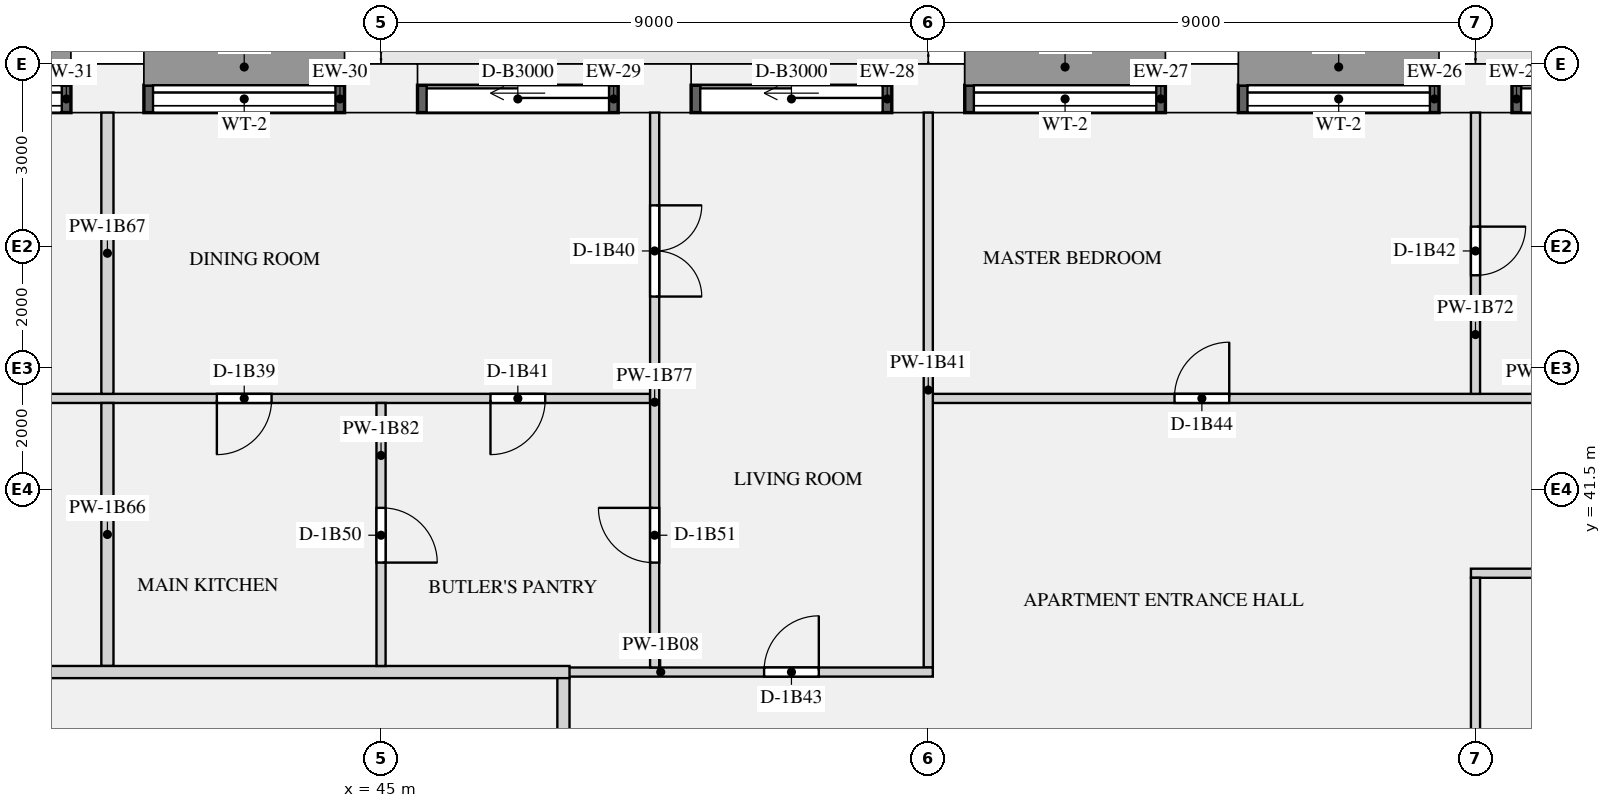
"""IFC4 building model, lengths in metres.
Left out: names, types, materials, properties, quantities, classifications, styles, units other than length and angle.
Written with IfcOpenShell. Run it as: python <this file> out.ifc"""

import sys

from ifc_helpers import new_model, si_unit, direction, frame, frame_2d, origin, origin_2d, place, context, subcontext, project, spatial, rectangle, extrude, element, fill, save


model = new_model("IFC4")
c1 = context("Model", 3, precision=1e-05, world=origin(), true_north=direction((0.0, 1.0)))
c2 = subcontext(c1, "Body", "Model", "MODEL_VIEW")
j1 = project(units=[si_unit("LENGTHUNIT", "METRE"), si_unit("PLANEANGLEUNIT", "RADIAN")], contexts=[c1])
p1 = place(None, origin())
s1 = spatial("IfcSite", under=j1, at=p1, CompositionType="ELEMENT")
p2 = place(p1, origin())
s2 = spatial("IfcBuilding", under=s1, at=p2, CompositionType="ELEMENT")
p3 = place(p2, frame((0.0, 0.0, 28.95)))
s3 = spatial("IfcBuildingStorey", under=s2, at=p3, CompositionType="ELEMENT", Elevation=28.95)
for number, where, z_axis, x_axis in (
    (1, (63.0, 48.1, 0.0), (0.0, 0.0, 1.0), (-1.0, 0.0, 0.0)),
    (2, (58.5, 48.1, 0.0), (0.0, 0.0, 1.0), (-1.0, 0.0, 0.0)),
    (3, (54.0, 48.1, 0.0), (0.0, 0.0, 1.0), (-1.0, 0.0, 0.0)),
    (4, (49.5, 48.1, 0.0), (0.0, 0.0, 1.0), (-1.0, 0.0, 0.0)),
    (5, (45.0, 48.1, 0.0), (0.0, 0.0, 1.0), (-1.0, 0.0, 0.0)),
    (6, (40.5, 48.1, 0.0), (0.0, 0.0, 1.0), (-1.0, 0.0, 0.0)),
):
    element("IfcColumn", number, at=place(p3, frame(where, z_axis=z_axis, x_axis=x_axis)), inside=s3, PredefinedType="USERDEFINED", context=c2, shape_type="SweptSolid", body=[
        extrude(rectangle(XDim=1.2, YDim=0.8, at=origin_2d()), origin(), (0.0, 0.0, 1.0), 3.15),
    ])
p4 = place(p3, frame((66.9, 47.925, 0.0), z_axis=(0.0, 0.0, 1.0), x_axis=(-1.0, 0.0, 0.0)))
e7 = element("IfcWall", 7, at=p4, inside=s3, PredefinedType="SOLIDWALL", context=c2, shape_type="SweptSolid", body=[
    extrude(rectangle(XDim=3.3, YDim=0.45, at=frame_2d((1.65, 0.0))), origin(), (0.0, 0.0, 1.0), 2.83),
])
p5 = place(p4, frame((0.15, 0.0, 0.0)))
e8 = element("IfcOpeningElement", 8, at=p5, cuts=e7, PredefinedType="OPENING", context=c2, shape_type="SweptSolid", body=[
    extrude(rectangle(XDim=3.0, YDim=2.3, at=frame_2d((1.5, 1.15))), frame((0.0, 0.235, 0.0), z_axis=(0.0, -1.0, 0.0), x_axis=(1.0, 0.0, 0.0)), (0.0, 0.0, 1.0), 0.47),
])
p6 = place(p3, frame((62.4, 47.925, 0.9), z_axis=(0.0, 0.0, 1.0), x_axis=(-1.0, 0.0, 0.0)))
e9 = element("IfcWall", 9, at=p6, inside=s3, PredefinedType="SOLIDWALL", context=c2, shape_type="SweptSolid", body=[
    extrude(rectangle(XDim=3.3, YDim=0.45, at=frame_2d((1.65, 0.0))), origin(), (0.0, 0.0, 1.0), 1.93),
])
p7 = place(p6, frame((0.15, 0.0, 0.15)))
e10 = element("IfcOpeningElement", 10, at=p7, cuts=e9, PredefinedType="OPENING", context=c2, shape_type="SweptSolid", body=[
    extrude(rectangle(XDim=3.0, YDim=1.5, at=frame_2d((1.5, 0.75))), frame((0.0, 0.235, 0.0), z_axis=(0.0, -1.0, 0.0), x_axis=(1.0, 0.0, 0.0)), (0.0, 0.0, 1.0), 0.47),
])
p8 = place(p3, frame((57.9, 47.925, 0.9), z_axis=(0.0, 0.0, 1.0), x_axis=(-1.0, 0.0, 0.0)))
e11 = element("IfcWall", 11, at=p8, inside=s3, PredefinedType="SOLIDWALL", context=c2, shape_type="SweptSolid", body=[
    extrude(rectangle(XDim=3.3, YDim=0.45, at=frame_2d((1.65, 0.0))), origin(), (0.0, 0.0, 1.0), 1.93),
])
p9 = place(p8, frame((0.15, 0.0, 0.15)))
e12 = element("IfcOpeningElement", 12, at=p9, cuts=e11, PredefinedType="OPENING", context=c2, shape_type="SweptSolid", body=[
    extrude(rectangle(XDim=3.0, YDim=1.5, at=frame_2d((1.5, 0.75))), frame((0.0, 0.235, 0.0), z_axis=(0.0, -1.0, 0.0), x_axis=(1.0, 0.0, 0.0)), (0.0, 0.0, 1.0), 0.47),
])
p10 = place(p3, frame((53.4, 47.925, 0.0), z_axis=(0.0, 0.0, 1.0), x_axis=(-1.0, 0.0, 0.0)))
e13 = element("IfcWall", 13, at=p10, inside=s3, PredefinedType="SOLIDWALL", context=c2, shape_type="SweptSolid", body=[
    extrude(rectangle(XDim=3.3, YDim=0.45, at=frame_2d((1.65, 0.0))), origin(), (0.0, 0.0, 1.0), 2.83),
])
p11 = place(p10, frame((0.15, 0.0, 0.0)))
e14 = element("IfcOpeningElement", 14, at=p11, cuts=e13, PredefinedType="OPENING", context=c2, shape_type="SweptSolid", body=[
    extrude(rectangle(XDim=3.0, YDim=2.3, at=frame_2d((1.5, 1.15))), frame((0.0, 0.235, 0.0), z_axis=(0.0, -1.0, 0.0), x_axis=(1.0, 0.0, 0.0)), (0.0, 0.0, 1.0), 0.47),
])
p12 = place(p3, frame((48.9, 47.925, 0.0), z_axis=(0.0, 0.0, 1.0), x_axis=(-1.0, 0.0, 0.0)))
e15 = element("IfcWall", 15, at=p12, inside=s3, PredefinedType="SOLIDWALL", context=c2, shape_type="SweptSolid", body=[
    extrude(rectangle(XDim=3.3, YDim=0.45, at=frame_2d((1.65, 0.0))), origin(), (0.0, 0.0, 1.0), 2.83),
])
p13 = place(p12, frame((0.15, 0.0, 0.0)))
e16 = element("IfcOpeningElement", 16, at=p13, cuts=e15, PredefinedType="OPENING", context=c2, shape_type="SweptSolid", body=[
    extrude(rectangle(XDim=3.0, YDim=2.3, at=frame_2d((1.5, 1.15))), frame((0.0, 0.235, 0.0), z_axis=(0.0, -1.0, 0.0), x_axis=(1.0, 0.0, 0.0)), (0.0, 0.0, 1.0), 0.47),
])
p14 = place(p3, frame((44.4, 47.925, 0.9), z_axis=(0.0, 0.0, 1.0), x_axis=(-1.0, 0.0, 0.0)))
e17 = element("IfcWall", 17, at=p14, inside=s3, PredefinedType="SOLIDWALL", context=c2, shape_type="SweptSolid", body=[
    extrude(rectangle(XDim=3.3, YDim=0.45, at=frame_2d((1.65, 0.0))), origin(), (0.0, 0.0, 1.0), 1.93),
])
p15 = place(p14, frame((0.15, 0.0, 0.15)))
e18 = element("IfcOpeningElement", 18, at=p15, cuts=e17, PredefinedType="OPENING", context=c2, shape_type="SweptSolid", body=[
    extrude(rectangle(XDim=3.0, YDim=1.5, at=frame_2d((1.5, 0.75))), frame((0.0, 0.235, 0.0), z_axis=(0.0, -1.0, 0.0), x_axis=(1.0, 0.0, 0.0)), (0.0, 0.0, 1.0), 0.47),
])
p16 = place(p3, frame((39.9, 47.925, 0.9), z_axis=(0.0, 0.0, 1.0), x_axis=(-1.0, 0.0, 0.0)))
e19 = element("IfcWall", 19, at=p16, inside=s3, PredefinedType="SOLIDWALL", context=c2, shape_type="SweptSolid", body=[
    extrude(rectangle(XDim=3.3, YDim=0.45, at=frame_2d((1.65, 0.0))), origin(), (0.0, 0.0, 1.0), 1.93),
])
p17 = place(p16, frame((0.15, 0.0, 0.15)))
e20 = element("IfcOpeningElement", 20, at=p17, cuts=e19, PredefinedType="OPENING", context=c2, shape_type="SweptSolid", body=[
    extrude(rectangle(XDim=3.0, YDim=1.5, at=frame_2d((1.5, 0.75))), frame((0.0, 0.235, 0.0), z_axis=(0.0, -1.0, 0.0), x_axis=(1.0, 0.0, 0.0)), (0.0, 0.0, 1.0), 0.47),
])
p18 = place(p3, frame((47.9, 38.5, 0.0), z_axis=(0.0, 0.0, 1.0), x_axis=(1.0, 0.0, 0.0)))
e21 = element("IfcWall", 21, at=p18, inside=s3, PredefinedType="PARTITIONING", context=c2, shape_type="SweptSolid", body=[
    extrude(rectangle(XDim=6.175, YDim=0.15, at=frame_2d((3.087, 0.0))), origin(), (0.0, 0.0, 1.0), 2.83),
])
p19 = place(p18, frame((3.4, 0.0, 0.0)))
e22 = element("IfcOpeningElement", 22, at=p19, cuts=e21, PredefinedType="OPENING", context=c2, shape_type="SweptSolid", body=[
    extrude(rectangle(XDim=0.9, YDim=2.1, at=frame_2d((0.45, 1.05))), frame((0.0, 0.085, 0.0), z_axis=(0.0, -1.0, 0.0), x_axis=(1.0, 0.0, 0.0)), (0.0, 0.0, 1.0), 0.17),
])
p20 = place(p3, frame((23.925, 38.5, 0.0), z_axis=(0.0, 0.0, 1.0), x_axis=(1.0, 0.0, 0.0)))
e23 = element("IfcWall", 23, at=p20, inside=s3, PredefinedType="PARTITIONING", context=c2, shape_type="SweptSolid", body=[
    extrude(rectangle(XDim=24.175, YDim=0.2, at=frame_2d((12.087, 0.0))), origin(), (0.0, 0.0, 1.0), 2.83),
])
p21 = place(p3, frame((18.075, 43.0, 0.0), z_axis=(0.0, 0.0, 1.0), x_axis=(1.0, 0.0, 0.0)))
e24 = element("IfcWall", 24, at=p21, inside=s3, PredefinedType="PARTITIONING", context=c2, shape_type="SweptSolid", body=[
    extrude(rectangle(XDim=31.35, YDim=0.15, at=frame_2d((15.675, 0.0))), origin(), (0.0, 0.0, 1.0), 2.83),
])
p22 = place(p21, frame((17.175, 0.0, 0.0)))
e25 = element("IfcOpeningElement", 25, at=p22, cuts=e24, PredefinedType="OPENING", context=c2, shape_type="SweptSolid", body=[
    extrude(rectangle(XDim=1.5, YDim=2.1, at=frame_2d((0.75, 1.05))), frame((0.0, 0.085, 0.0), z_axis=(0.0, -1.0, 0.0), x_axis=(1.0, 0.0, 0.0)), (0.0, 0.0, 1.0), 0.17),
])
p23 = place(p21, frame((11.475, 0.0, 0.0)))
e26 = element("IfcOpeningElement", 26, at=p23, cuts=e24, PredefinedType="OPENING", context=c2, shape_type="SweptSolid", body=[
    extrude(rectangle(XDim=0.9, YDim=2.1, at=frame_2d((0.45, 1.05))), frame((0.0, 0.085, 0.0), z_axis=(0.0, -1.0, 0.0), x_axis=(1.0, 0.0, 0.0)), (0.0, 0.0, 1.0), 0.17),
])
p24 = place(p21, frame((2.475, 0.0, 0.0)))
e27 = element("IfcOpeningElement", 27, at=p24, cuts=e24, PredefinedType="OPENING", context=c2, shape_type="SweptSolid", body=[
    extrude(rectangle(XDim=0.9, YDim=2.1, at=frame_2d((0.45, 1.05))), frame((0.0, 0.085, 0.0), z_axis=(0.0, -1.0, 0.0), x_axis=(1.0, 0.0, 0.0)), (0.0, 0.0, 1.0), 0.17),
])
p25 = place(p21, frame((24.225, 0.0, 0.0)))
e28 = element("IfcOpeningElement", 28, at=p25, cuts=e24, PredefinedType="OPENING", context=c2, shape_type="SweptSolid", body=[
    extrude(rectangle(XDim=0.9, YDim=2.1, at=frame_2d((0.45, 1.05))), frame((0.0, 0.085, 0.0), z_axis=(0.0, -1.0, 0.0), x_axis=(1.0, 0.0, 0.0)), (0.0, 0.0, 1.0), 0.17),
])
p26 = place(p21, frame((28.725, 0.0, 0.0)))
e29 = element("IfcOpeningElement", 29, at=p26, cuts=e24, PredefinedType="OPENING", context=c2, shape_type="SweptSolid", body=[
    extrude(rectangle(XDim=0.9, YDim=2.1, at=frame_2d((0.45, 1.05))), frame((0.0, 0.085, 0.0), z_axis=(0.0, -1.0, 0.0), x_axis=(1.0, 0.0, 0.0)), (0.0, 0.0, 1.0), 0.17),
])
p27 = place(p3, frame((54.075, 43.0, 0.0), z_axis=(0.0, 0.0, 1.0), x_axis=(1.0, 0.0, 0.0)))
e30 = element("IfcWall", 30, at=p27, inside=s3, PredefinedType="PARTITIONING", context=c2, shape_type="SweptSolid", body=[
    extrude(rectangle(XDim=17.85, YDim=0.15, at=frame_2d((8.925, 0.0))), origin(), (0.0, 0.0, 1.0), 2.83),
])
p28 = place(p27, frame((15.225, 0.0, 0.0)))
e31 = element("IfcOpeningElement", 31, at=p28, cuts=e30, PredefinedType="OPENING", context=c2, shape_type="SweptSolid", body=[
    extrude(rectangle(XDim=0.9, YDim=2.1, at=frame_2d((0.45, 1.05))), frame((0.0, 0.085, 0.0), z_axis=(0.0, -1.0, 0.0), x_axis=(1.0, 0.0, 0.0)), (0.0, 0.0, 1.0), 0.17),
])
p29 = place(p27, frame((3.975, 0.0, 0.0)))
e32 = element("IfcOpeningElement", 32, at=p29, cuts=e30, PredefinedType="OPENING", context=c2, shape_type="SweptSolid", body=[
    extrude(rectangle(XDim=0.9, YDim=2.1, at=frame_2d((0.45, 1.05))), frame((0.0, 0.085, 0.0), z_axis=(0.0, -1.0, 0.0), x_axis=(1.0, 0.0, 0.0)), (0.0, 0.0, 1.0), 0.17),
])
p30 = place(p3, frame((62.925, 40.125, 0.0), z_axis=(0.0, 0.0, 1.0), x_axis=(1.0, 0.0, 0.0)))
e33 = element("IfcWall", 33, at=p30, inside=s3, PredefinedType="PARTITIONING", context=c2, shape_type="SweptSolid", body=[
    extrude(rectangle(XDim=12.775, YDim=0.15, at=frame_2d((6.387, 0.0))), origin(), (0.0, 0.0, 1.0), 2.83),
])
p31 = place(p30, frame((4.125, 0.0, 0.0)))
e34 = element("IfcOpeningElement", 34, at=p31, cuts=e33, PredefinedType="OPENING", context=c2, shape_type="SweptSolid", body=[
    extrude(rectangle(XDim=0.9, YDim=2.1, at=frame_2d((0.45, 1.05))), frame((0.0, 0.085, 0.0), z_axis=(0.0, -1.0, 0.0), x_axis=(1.0, 0.0, 0.0)), (0.0, 0.0, 1.0), 0.17),
])
p32 = place(p3, frame((54.0, 38.575, 0.0), z_axis=(0.0, 0.0, 1.0), x_axis=(0.0, 1.0, 0.0)))
e35 = element("IfcWall", 35, at=p32, inside=s3, PredefinedType="PARTITIONING", context=c2, shape_type="SweptSolid", body=[
    extrude(rectangle(XDim=9.125, YDim=0.15, at=frame_2d((4.562, 0.0))), origin(), (0.0, 0.0, 1.0), 2.83),
])
p33 = place(p3, frame((48.0, 27.1, 0.0), z_axis=(0.0, 0.0, 1.0), x_axis=(0.0, 1.0, 0.0)))
e36 = element("IfcWall", 36, at=p33, inside=s3, PredefinedType="PARTITIONING", context=c2, shape_type="SweptSolid", body=[
    extrude(rectangle(XDim=11.325, YDim=0.2, at=frame_2d((5.663, 0.0))), origin(), (0.0, 0.0, 1.0), 2.83),
])
p34 = place(p33, frame((5.35, 0.0, 0.0)))
e37 = element("IfcOpeningElement", 37, at=p34, cuts=e36, PredefinedType="OPENING", context=c2, shape_type="SweptSolid", body=[
    extrude(rectangle(XDim=1.1, YDim=2.1, at=frame_2d((0.55, 1.05))), frame((0.0, 0.11, 0.0), z_axis=(0.0, -1.0, 0.0), x_axis=(1.0, 0.0, 0.0)), (0.0, 0.0, 1.0), 0.22),
])
p35 = place(p3, frame((40.5, 38.6, 0.0), z_axis=(0.0, 0.0, 1.0), x_axis=(0.0, 1.0, 0.0)))
e38 = element("IfcWall", 38, at=p35, inside=s3, PredefinedType="PARTITIONING", context=c2, shape_type="SweptSolid", body=[
    extrude(rectangle(XDim=4.325, YDim=0.2, at=frame_2d((2.163, 0.0))), origin(), (0.0, 0.0, 1.0), 2.83),
])
p36 = place(p3, frame((40.5, 43.075, 0.0), z_axis=(0.0, 0.0, 1.0), x_axis=(0.0, 1.0, 0.0)))
e39 = element("IfcWall", 39, at=p36, inside=s3, PredefinedType="PARTITIONING", context=c2, shape_type="SweptSolid", body=[
    extrude(rectangle(XDim=4.625, YDim=0.2, at=frame_2d((2.312, 0.0))), origin(), (0.0, 0.0, 1.0), 2.83),
])
p37 = place(p3, frame((63.0, 32.475, 0.0), z_axis=(0.0, 0.0, 1.0), x_axis=(0.0, 1.0, 0.0)))
e40 = element("IfcWall", 40, at=p37, inside=s3, PredefinedType="PARTITIONING", context=c2, shape_type="SweptSolid", body=[
    extrude(rectangle(XDim=7.575, YDim=0.15, at=frame_2d((3.788, 0.0))), origin(), (0.0, 0.0, 1.0), 2.83),
])
p38 = place(p3, frame((63.0, 43.075, 0.0), z_axis=(0.0, 0.0, 1.0), x_axis=(0.0, 1.0, 0.0)))
e41 = element("IfcWall", 41, at=p38, inside=s3, PredefinedType="PARTITIONING", context=c2, shape_type="SweptSolid", body=[
    extrude(rectangle(XDim=4.625, YDim=0.15, at=frame_2d((2.312, 0.0))), origin(), (0.0, 0.0, 1.0), 2.83),
])
p39 = place(p38, frame((1.95, 0.0, 0.0)))
e42 = element("IfcOpeningElement", 42, at=p39, cuts=e41, PredefinedType="OPENING", context=c2, shape_type="SweptSolid", body=[
    extrude(rectangle(XDim=0.8, YDim=2.1, at=frame_2d((0.4, 1.05))), frame((0.0, 0.085, 0.0), z_axis=(0.0, -1.0, 0.0), x_axis=(1.0, 0.0, 0.0)), (0.0, 0.0, 1.0), 0.17),
])
p40 = place(p3, frame((49.5, 38.575, 0.0), z_axis=(0.0, 0.0, 1.0), x_axis=(0.0, 1.0, 0.0)))
e43 = element("IfcWall", 43, at=p40, inside=s3, PredefinedType="PARTITIONING", context=c2, shape_type="SweptSolid", body=[
    extrude(rectangle(XDim=9.125, YDim=0.15, at=frame_2d((4.562, 0.0))), origin(), (0.0, 0.0, 1.0), 2.83),
])
p41 = place(p40, frame((6.1, 0.0, 0.0)))
e44 = element("IfcOpeningElement", 44, at=p41, cuts=e43, PredefinedType="OPENING", context=c2, shape_type="SweptSolid", body=[
    extrude(rectangle(XDim=1.5, YDim=2.1, at=frame_2d((0.75, 1.05))), frame((0.0, 0.085, 0.0), z_axis=(0.0, -1.0, 0.0), x_axis=(1.0, 0.0, 0.0)), (0.0, 0.0, 1.0), 0.17),
])
p42 = place(p40, frame((1.725, 0.0, 0.0)))
e45 = element("IfcOpeningElement", 45, at=p42, cuts=e43, PredefinedType="OPENING", context=c2, shape_type="SweptSolid", body=[
    extrude(rectangle(XDim=0.9, YDim=2.1, at=frame_2d((0.45, 1.05))), frame((0.0, 0.085, 0.0), z_axis=(0.0, -1.0, 0.0), x_axis=(1.0, 0.0, 0.0)), (0.0, 0.0, 1.0), 0.17),
])
p43 = place(p3, frame((45.0, 38.6, 0.0), z_axis=(0.0, 0.0, 1.0), x_axis=(0.0, 1.0, 0.0)))
e46 = element("IfcWall", 46, at=p43, inside=s3, PredefinedType="PARTITIONING", context=c2, shape_type="SweptSolid", body=[
    extrude(rectangle(XDim=4.325, YDim=0.15, at=frame_2d((2.163, 0.0))), origin(), (0.0, 0.0, 1.0), 2.83),
])
p44 = place(p43, frame((1.7, 0.0, 0.0)))
e47 = element("IfcOpeningElement", 47, at=p44, cuts=e46, PredefinedType="OPENING", context=c2, shape_type="SweptSolid", body=[
    extrude(rectangle(XDim=0.9, YDim=2.1, at=frame_2d((0.45, 1.05))), frame((0.0, 0.085, 0.0), z_axis=(0.0, -1.0, 0.0), x_axis=(1.0, 0.0, 0.0)), (0.0, 0.0, 1.0), 0.17),
])
p45 = place(p5, origin())
e48 = element("IfcDoor", 48, at=p45, inside=s3, OperationType="SLIDING_TO_LEFT", PredefinedType="DOOR", context=c2, shape_type="SweptSolid", body=[
    extrude(rectangle(XDim=3.0, YDim=2.3, at=frame_2d((1.5, 1.15))), frame((0.0, -0.07, 0.0), z_axis=(0.0, -1.0, 0.0), x_axis=(1.0, 0.0, 0.0)), (0.0, 0.0, 1.0), 0.05),
])
fill(e8, e48)
p46 = place(p7, origin())
e49 = element("IfcWindow", 49, at=p46, inside=s3, PartitioningType="SINGLE_PANEL", PredefinedType="WINDOW", context=c2, shape_type="SweptSolid", body=[
    extrude(rectangle(XDim=3.0, YDim=1.5, at=frame_2d((1.5, 0.75))), frame((0.0, -0.065, 0.0), z_axis=(0.0, -1.0, 0.0), x_axis=(1.0, 0.0, 0.0)), (0.0, 0.0, 1.0), 0.06),
])
fill(e10, e49)
p47 = place(p9, origin())
e50 = element("IfcWindow", 50, at=p47, inside=s3, PartitioningType="SINGLE_PANEL", PredefinedType="WINDOW", context=c2, shape_type="SweptSolid", body=[
    extrude(rectangle(XDim=3.0, YDim=1.5, at=frame_2d((1.5, 0.75))), frame((0.0, -0.065, 0.0), z_axis=(0.0, -1.0, 0.0), x_axis=(1.0, 0.0, 0.0)), (0.0, 0.0, 1.0), 0.06),
])
fill(e12, e50)
p48 = place(p11, origin())
e51 = element("IfcDoor", 51, at=p48, inside=s3, OperationType="SLIDING_TO_LEFT", PredefinedType="DOOR", context=c2, shape_type="SweptSolid", body=[
    extrude(rectangle(XDim=3.0, YDim=2.3, at=frame_2d((1.5, 1.15))), frame((0.0, -0.07, 0.0), z_axis=(0.0, -1.0, 0.0), x_axis=(1.0, 0.0, 0.0)), (0.0, 0.0, 1.0), 0.05),
])
fill(e14, e51)
p49 = place(p13, origin())
e52 = element("IfcDoor", 52, at=p49, inside=s3, OperationType="SLIDING_TO_LEFT", PredefinedType="DOOR", context=c2, shape_type="SweptSolid", body=[
    extrude(rectangle(XDim=3.0, YDim=2.3, at=frame_2d((1.5, 1.15))), frame((0.0, -0.07, 0.0), z_axis=(0.0, -1.0, 0.0), x_axis=(1.0, 0.0, 0.0)), (0.0, 0.0, 1.0), 0.05),
])
fill(e16, e52)
p50 = place(p15, origin())
e53 = element("IfcWindow", 53, at=p50, inside=s3, PartitioningType="SINGLE_PANEL", PredefinedType="WINDOW", context=c2, shape_type="SweptSolid", body=[
    extrude(rectangle(XDim=3.0, YDim=1.5, at=frame_2d((1.5, 0.75))), frame((0.0, -0.065, 0.0), z_axis=(0.0, -1.0, 0.0), x_axis=(1.0, 0.0, 0.0)), (0.0, 0.0, 1.0), 0.06),
])
fill(e18, e53)
p51 = place(p17, origin())
e54 = element("IfcWindow", 54, at=p51, inside=s3, PartitioningType="SINGLE_PANEL", PredefinedType="WINDOW", context=c2, shape_type="SweptSolid", body=[
    extrude(rectangle(XDim=3.0, YDim=1.5, at=frame_2d((1.5, 0.75))), frame((0.0, -0.065, 0.0), z_axis=(0.0, -1.0, 0.0), x_axis=(1.0, 0.0, 0.0)), (0.0, 0.0, 1.0), 0.06),
])
fill(e20, e54)
p52 = place(p25, frame((0.9, 0.0, 0.0), z_axis=(0.0, 0.0, 1.0), x_axis=(-1.0, 0.0, 0.0)))
e55 = element("IfcDoor", 55, at=p52, inside=s3, OperationType="SINGLE_SWING_RIGHT", PredefinedType="DOOR", context=c2, shape_type="SweptSolid", body=[
    extrude(rectangle(XDim=0.9, YDim=2.1, at=frame_2d((0.45, 1.05))), frame((0.0, 0.025, 0.0), z_axis=(0.0, -1.0, 0.0), x_axis=(1.0, 0.0, 0.0)), (0.0, 0.0, 1.0), 0.05),
])
fill(e28, e55)
p53 = place(p41, frame((1.5, 0.0, 0.0), z_axis=(0.0, 0.0, 1.0), x_axis=(-1.0, 0.0, 0.0)))
e56 = element("IfcDoor", 56, at=p53, inside=s3, OperationType="DOUBLE_DOOR_SINGLE_SWING", PredefinedType="DOOR", context=c2, shape_type="SweptSolid", body=[
    extrude(rectangle(XDim=1.5, YDim=2.1, at=frame_2d((0.75, 1.05))), frame((0.0, 0.025, 0.0), z_axis=(0.0, -1.0, 0.0), x_axis=(1.0, 0.0, 0.0)), (0.0, 0.0, 1.0), 0.05),
])
fill(e44, e56)
p54 = place(p26, frame((0.9, 0.0, 0.0), z_axis=(0.0, 0.0, 1.0), x_axis=(-1.0, 0.0, 0.0)))
e57 = element("IfcDoor", 57, at=p54, inside=s3, OperationType="SINGLE_SWING_RIGHT", PredefinedType="DOOR", context=c2, shape_type="SweptSolid", body=[
    extrude(rectangle(XDim=0.9, YDim=2.1, at=frame_2d((0.45, 1.05))), frame((0.0, 0.025, 0.0), z_axis=(0.0, -1.0, 0.0), x_axis=(1.0, 0.0, 0.0)), (0.0, 0.0, 1.0), 0.05),
])
fill(e29, e57)
p55 = place(p39, frame((0.8, 0.0, 0.0), z_axis=(0.0, 0.0, 1.0), x_axis=(-1.0, 0.0, 0.0)))
e58 = element("IfcDoor", 58, at=p55, inside=s3, OperationType="SINGLE_SWING_LEFT", PredefinedType="DOOR", context=c2, shape_type="SweptSolid", body=[
    extrude(rectangle(XDim=0.8, YDim=2.1, at=frame_2d((0.4, 1.05))), frame((0.0, 0.025, 0.0), z_axis=(0.0, -1.0, 0.0), x_axis=(1.0, 0.0, 0.0)), (0.0, 0.0, 1.0), 0.05),
])
fill(e42, e58)
p56 = place(p19, origin())
e59 = element("IfcDoor", 59, at=p56, inside=s3, OperationType="SINGLE_SWING_RIGHT", PredefinedType="DOOR", context=c2, shape_type="SweptSolid", body=[
    extrude(rectangle(XDim=0.9, YDim=2.1, at=frame_2d((0.45, 1.05))), frame((0.0, 0.025, 0.0), z_axis=(0.0, -1.0, 0.0), x_axis=(1.0, 0.0, 0.0)), (0.0, 0.0, 1.0), 0.05),
])
fill(e22, e59)
p57 = place(p29, origin())
e60 = element("IfcDoor", 60, at=p57, inside=s3, OperationType="SINGLE_SWING_RIGHT", PredefinedType="DOOR", context=c2, shape_type="SweptSolid", body=[
    extrude(rectangle(XDim=0.9, YDim=2.1, at=frame_2d((0.45, 1.05))), frame((0.0, 0.025, 0.0), z_axis=(0.0, -1.0, 0.0), x_axis=(1.0, 0.0, 0.0)), (0.0, 0.0, 1.0), 0.05),
])
fill(e32, e60)
p58 = place(p44, frame((0.9, 0.0, 0.0), z_axis=(0.0, 0.0, 1.0), x_axis=(-1.0, 0.0, 0.0)))
e61 = element("IfcDoor", 61, at=p58, inside=s3, OperationType="SINGLE_SWING_RIGHT", PredefinedType="DOOR", context=c2, shape_type="SweptSolid", body=[
    extrude(rectangle(XDim=0.9, YDim=2.1, at=frame_2d((0.45, 1.05))), frame((0.0, 0.025, 0.0), z_axis=(0.0, -1.0, 0.0), x_axis=(1.0, 0.0, 0.0)), (0.0, 0.0, 1.0), 0.05),
])
fill(e47, e61)
p59 = place(p42, origin())
e62 = element("IfcDoor", 62, at=p59, inside=s3, OperationType="SINGLE_SWING_RIGHT", PredefinedType="DOOR", context=c2, shape_type="SweptSolid", body=[
    extrude(rectangle(XDim=0.9, YDim=2.1, at=frame_2d((0.45, 1.05))), frame((0.0, 0.025, 0.0), z_axis=(0.0, -1.0, 0.0), x_axis=(1.0, 0.0, 0.0)), (0.0, 0.0, 1.0), 0.05),
])
fill(e45, e62)
save(model, sys.argv[1])
